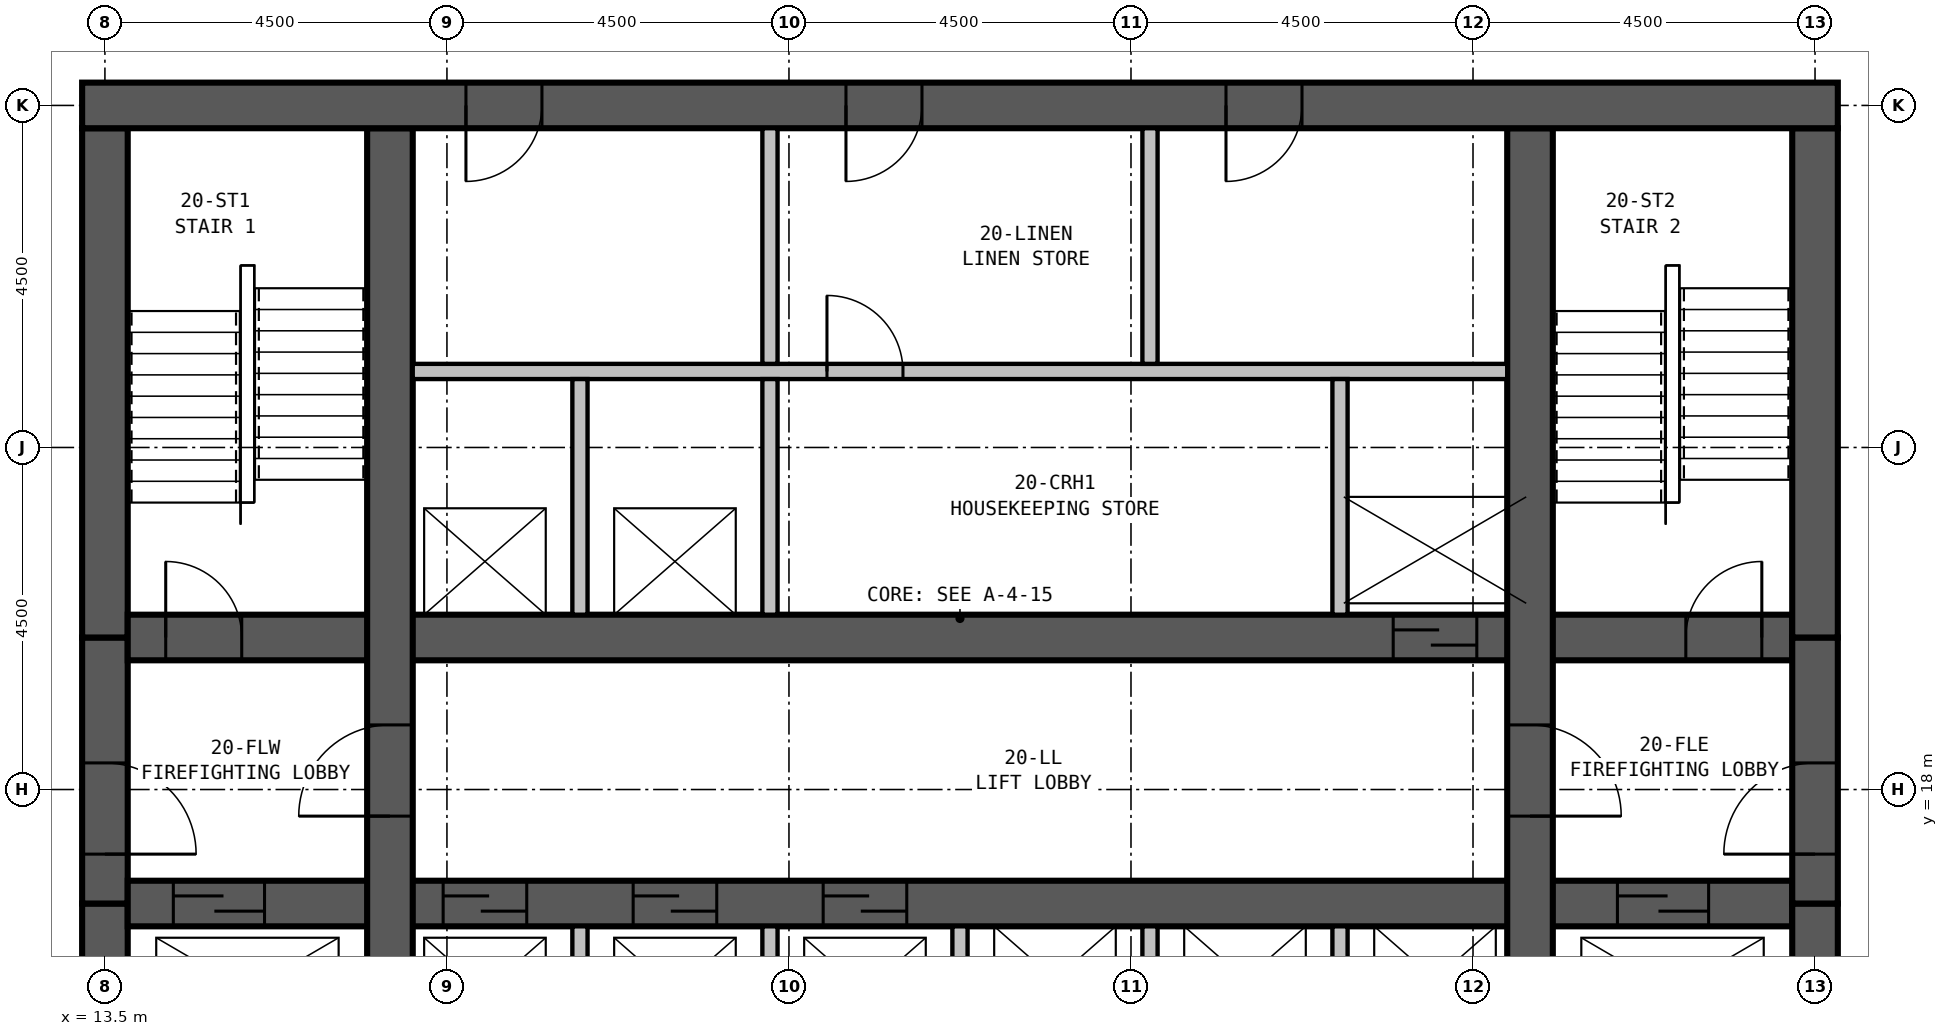
"""IFC4 building model, lengths in metres.
Left out: names, types, materials, properties, quantities, classifications, styles, units other than length and angle.
Written with IfcOpenShell. Run it as: python <this file> out.ifc"""

import sys

from ifc_helpers import new_model, si_unit, direction, frame, frame_2d, origin, place, context, subcontext, project, spatial, rectangle, extrude, element, fill, save


model = new_model("IFC4")
c1 = context("Model", 3, precision=1e-05, world=origin(), true_north=direction((0.0, 1.0)))
c2 = subcontext(c1, "Body", "Model", "MODEL_VIEW")
j1 = project(units=[si_unit("LENGTHUNIT", "METRE"), si_unit("PLANEANGLEUNIT", "RADIAN")], contexts=[c1])
p1 = place(None, origin())
s1 = spatial("IfcSite", under=j1, at=p1, CompositionType="ELEMENT")
p2 = place(p1, origin())
s2 = spatial("IfcBuilding", under=s1, at=p2, CompositionType="ELEMENT")
p3 = place(p2, frame((0.0, 0.0, 82.2)))
s3 = spatial("IfcBuildingStorey", under=s2, at=p3, CompositionType="ELEMENT", Elevation=82.2)
p4 = place(p3, frame((36.3, 27.0, 0.0), z_axis=(0.0, 0.0, 1.0), x_axis=(-1.0, 0.0, 0.0)))
e1 = element("IfcWall", 1, at=p4, inside=s3, PredefinedType="SHEAR", context=c2, shape_type="SweptSolid", body=[
    extrude(rectangle(XDim=23.1, YDim=0.6, at=frame_2d((11.55, 0.0))), origin(), (0.0, 0.0, 1.0), 3.5),
])
p5 = place(p4, frame((17.05, 0.0, 0.0)))
e2 = element("IfcOpeningElement", 2, at=p5, cuts=e1, PredefinedType="OPENING", context=c2, shape_type="SweptSolid", body=[
    extrude(rectangle(XDim=1.0, YDim=2.1, at=frame_2d((0.5, 1.05))), frame((0.0, 0.31, 0.0), z_axis=(0.0, -1.0, 0.0), x_axis=(1.0, 0.0, 0.0)), (0.0, 0.0, 1.0), 0.62),
])
p6 = place(p4, frame((12.05, 0.0, 0.0)))
e3 = element("IfcOpeningElement", 3, at=p6, cuts=e1, PredefinedType="OPENING", context=c2, shape_type="SweptSolid", body=[
    extrude(rectangle(XDim=1.0, YDim=2.1, at=frame_2d((0.5, 1.05))), frame((0.0, 0.31, 0.0), z_axis=(0.0, -1.0, 0.0), x_axis=(1.0, 0.0, 0.0)), (0.0, 0.0, 1.0), 0.62),
])
p7 = place(p4, frame((7.05, 0.0, 0.0)))
e4 = element("IfcOpeningElement", 4, at=p7, cuts=e1, PredefinedType="OPENING", context=c2, shape_type="SweptSolid", body=[
    extrude(rectangle(XDim=1.0, YDim=2.1, at=frame_2d((0.5, 1.05))), frame((0.0, 0.31, 0.0), z_axis=(0.0, -1.0, 0.0), x_axis=(1.0, 0.0, 0.0)), (0.0, 0.0, 1.0), 0.62),
])
p8 = place(p3, frame((17.25, 13.8, 0.0), z_axis=(0.0, 0.0, 1.0), x_axis=(0.0, 1.0, 0.0)))
e5 = element("IfcWall", 5, at=p8, inside=s3, PredefinedType="SHEAR", context=c2, shape_type="SweptSolid", body=[
    extrude(rectangle(XDim=12.9, YDim=0.6, at=frame_2d((6.45, 0.0))), origin(), (0.0, 0.0, 1.0), 3.5),
])
p9 = place(p8, frame((3.85, 0.0, 0.0)))
e6 = element("IfcOpeningElement", 6, at=p9, cuts=e5, PredefinedType="OPENING", context=c2, shape_type="SweptSolid", body=[
    extrude(rectangle(XDim=1.2, YDim=2.1, at=frame_2d((0.6, 1.05))), frame((0.0, 0.31, 0.0), z_axis=(0.0, -1.0, 0.0), x_axis=(1.0, 0.0, 0.0)), (0.0, 0.0, 1.0), 0.62),
])
p10 = place(p3, frame((32.25, 13.8, 0.0), z_axis=(0.0, 0.0, 1.0), x_axis=(0.0, 1.0, 0.0)))
e7 = element("IfcWall", 7, at=p10, inside=s3, PredefinedType="SHEAR", context=c2, shape_type="SweptSolid", body=[
    extrude(rectangle(XDim=12.9, YDim=0.6, at=frame_2d((6.45, 0.0))), origin(), (0.0, 0.0, 1.0), 3.5),
])
p11 = place(p10, frame((5.05, 0.0, 0.0), z_axis=(0.0, 0.0, 1.0), x_axis=(-1.0, 0.0, 0.0)))
e8 = element("IfcOpeningElement", 8, at=p11, cuts=e7, PredefinedType="OPENING", context=c2, shape_type="SweptSolid", body=[
    extrude(rectangle(XDim=1.2, YDim=2.1, at=frame_2d((0.6, 1.05))), frame((0.0, 0.31, 0.0), z_axis=(0.0, -1.0, 0.0), x_axis=(1.0, 0.0, 0.0)), (0.0, 0.0, 1.0), 0.62),
])
p12 = place(p3, frame((13.8, 16.5, 0.0), z_axis=(0.0, 0.0, 1.0), x_axis=(1.0, 0.0, 0.0)))
e9 = element("IfcWall", 9, at=p12, inside=s3, PredefinedType="SHEAR", context=c2, shape_type="SweptSolid", body=[
    extrude(rectangle(XDim=21.9, YDim=0.6, at=frame_2d((10.95, 0.0))), origin(), (0.0, 0.0, 1.0), 3.5),
])
p13 = place(p12, frame((4.15, 0.0, 0.0)))
e10 = element("IfcOpeningElement", 10, at=p13, cuts=e9, PredefinedType="OPENING", context=c2, shape_type="SweptSolid", body=[
    extrude(rectangle(XDim=1.1, YDim=2.1, at=frame_2d((0.55, 1.05))), frame((0.0, 0.31, 0.0), z_axis=(0.0, -1.0, 0.0), x_axis=(1.0, 0.0, 0.0)), (0.0, 0.0, 1.0), 0.62),
])
p14 = place(p12, frame((6.65, 0.0, 0.0)))
e11 = element("IfcOpeningElement", 11, at=p14, cuts=e9, PredefinedType="OPENING", context=c2, shape_type="SweptSolid", body=[
    extrude(rectangle(XDim=1.1, YDim=2.1, at=frame_2d((0.55, 1.05))), frame((0.0, 0.31, 0.0), z_axis=(0.0, -1.0, 0.0), x_axis=(1.0, 0.0, 0.0)), (0.0, 0.0, 1.0), 0.62),
])
p15 = place(p12, frame((9.15, 0.0, 0.0)))
e12 = element("IfcOpeningElement", 12, at=p15, cuts=e9, PredefinedType="OPENING", context=c2, shape_type="SweptSolid", body=[
    extrude(rectangle(XDim=1.1, YDim=2.1, at=frame_2d((0.55, 1.05))), frame((0.0, 0.31, 0.0), z_axis=(0.0, -1.0, 0.0), x_axis=(1.0, 0.0, 0.0)), (0.0, 0.0, 1.0), 0.62),
])
p16 = place(p12, frame((0.6, 0.0, 0.0)))
e13 = element("IfcOpeningElement", 13, at=p16, cuts=e9, PredefinedType="OPENING", context=c2, shape_type="SweptSolid", body=[
    extrude(rectangle(XDim=1.2, YDim=2.1, at=frame_2d((0.6, 1.05))), frame((0.0, 0.31, 0.0), z_axis=(0.0, -1.0, 0.0), x_axis=(1.0, 0.0, 0.0)), (0.0, 0.0, 1.0), 0.62),
])
p17 = place(p12, frame((19.6, 0.0, 0.0)))
e14 = element("IfcOpeningElement", 14, at=p17, cuts=e9, PredefinedType="OPENING", context=c2, shape_type="SweptSolid", body=[
    extrude(rectangle(XDim=1.2, YDim=2.1, at=frame_2d((0.6, 1.05))), frame((0.0, 0.31, 0.0), z_axis=(0.0, -1.0, 0.0), x_axis=(1.0, 0.0, 0.0)), (0.0, 0.0, 1.0), 0.62),
])
p18 = place(p3, frame((13.8, 20.0, 0.0), z_axis=(0.0, 0.0, 1.0), x_axis=(1.0, 0.0, 0.0)))
e15 = element("IfcWall", 15, at=p18, inside=s3, PredefinedType="SHEAR", context=c2, shape_type="SweptSolid", body=[
    extrude(rectangle(XDim=21.9, YDim=0.6, at=frame_2d((10.95, 0.0))), origin(), (0.0, 0.0, 1.0), 3.5),
])
p19 = place(p18, frame((0.5, 0.0, 0.0)))
e16 = element("IfcOpeningElement", 16, at=p19, cuts=e15, PredefinedType="OPENING", context=c2, shape_type="SweptSolid", body=[
    extrude(rectangle(XDim=1.0, YDim=2.1, at=frame_2d((0.5, 1.05))), frame((0.0, 0.31, 0.0), z_axis=(0.0, -1.0, 0.0), x_axis=(1.0, 0.0, 0.0)), (0.0, 0.0, 1.0), 0.62),
])
p20 = place(p18, frame((20.5, 0.0, 0.0)))
e17 = element("IfcOpeningElement", 17, at=p20, cuts=e15, PredefinedType="OPENING", context=c2, shape_type="SweptSolid", body=[
    extrude(rectangle(XDim=1.0, YDim=2.1, at=frame_2d((0.5, 1.05))), frame((0.0, 0.31, 0.0), z_axis=(0.0, -1.0, 0.0), x_axis=(1.0, 0.0, 0.0)), (0.0, 0.0, 1.0), 0.62),
])
p21 = place(p18, frame((16.65, 0.0, 0.0)))
e18 = element("IfcOpeningElement", 18, at=p21, cuts=e15, PredefinedType="OPENING", context=c2, shape_type="SweptSolid", body=[
    extrude(rectangle(XDim=1.1, YDim=2.1, at=frame_2d((0.55, 1.05))), frame((0.0, 0.31, 0.0), z_axis=(0.0, -1.0, 0.0), x_axis=(1.0, 0.0, 0.0)), (0.0, 0.0, 1.0), 0.62),
])
p22 = place(p3, frame((13.5, 26.7, 0.0), z_axis=(0.0, 0.0, 1.0), x_axis=(0.0, -1.0, 0.0)))
e19 = element("IfcWall", 19, at=p22, inside=s3, PredefinedType="SHEAR", context=c2, shape_type="SweptSolid", body=[
    extrude(rectangle(XDim=6.7, YDim=0.6, at=frame_2d((3.35, 0.0))), origin(), (0.0, 0.0, 1.0), 3.5),
])
p23 = place(p3, frame((13.5, 20.0, 0.0), z_axis=(0.0, 0.0, 1.0), x_axis=(0.0, -1.0, 0.0)))
e20 = element("IfcWall", 20, at=p23, inside=s3, PredefinedType="SHEAR", context=c2, shape_type="SweptSolid", body=[
    extrude(rectangle(XDim=3.5, YDim=0.6, at=frame_2d((1.75, 0.0))), origin(), (0.0, 0.0, 1.0), 3.5),
])
p24 = place(p23, frame((1.65, 0.0, 0.0)))
e21 = element("IfcOpeningElement", 21, at=p24, cuts=e20, PredefinedType="OPENING", context=c2, shape_type="SweptSolid", body=[
    extrude(rectangle(XDim=1.2, YDim=2.1, at=frame_2d((0.6, 1.05))), frame((0.0, 0.31, 0.0), z_axis=(0.0, -1.0, 0.0), x_axis=(1.0, 0.0, 0.0)), (0.0, 0.0, 1.0), 0.62),
])
for number, where, z_axis, x_axis in (
    (22, (13.5, 16.5, 0.0), (0.0, 0.0, 1.0), (0.0, -1.0, 0.0)),
    (23, (36.0, 13.8, 0.0), (0.0, 0.0, 1.0), (0.0, 1.0, 0.0)),
):
    element("IfcWall", number, at=place(p3, frame(where, z_axis=z_axis, x_axis=x_axis)), inside=s3, PredefinedType="SHEAR", context=c2, shape_type="SweptSolid", body=[
        extrude(rectangle(XDim=2.7, YDim=0.6, at=frame_2d((1.35, 0.0))), origin(), (0.0, 0.0, 1.0), 3.5),
    ])
p25 = place(p3, frame((36.0, 16.5, 0.0), z_axis=(0.0, 0.0, 1.0), x_axis=(0.0, 1.0, 0.0)))
e24 = element("IfcWall", 24, at=p25, inside=s3, PredefinedType="SHEAR", context=c2, shape_type="SweptSolid", body=[
    extrude(rectangle(XDim=3.5, YDim=0.6, at=frame_2d((1.75, 0.0))), origin(), (0.0, 0.0, 1.0), 3.5),
])
p26 = place(p25, frame((0.65, 0.0, 0.0)))
e25 = element("IfcOpeningElement", 25, at=p26, cuts=e24, PredefinedType="OPENING", context=c2, shape_type="SweptSolid", body=[
    extrude(rectangle(XDim=1.2, YDim=2.1, at=frame_2d((0.6, 1.05))), frame((0.0, 0.31, 0.0), z_axis=(0.0, -1.0, 0.0), x_axis=(1.0, 0.0, 0.0)), (0.0, 0.0, 1.0), 0.62),
])
p27 = place(p3, frame((36.0, 20.0, 0.0), z_axis=(0.0, 0.0, 1.0), x_axis=(0.0, 1.0, 0.0)))
e26 = element("IfcWall", 26, at=p27, inside=s3, PredefinedType="SHEAR", context=c2, shape_type="SweptSolid", body=[
    extrude(rectangle(XDim=6.7, YDim=0.6, at=frame_2d((3.35, 0.0))), origin(), (0.0, 0.0, 1.0), 3.5),
])
p28 = place(p3, frame((19.75, 13.8, 0.0), z_axis=(0.0, 0.0, 1.0), x_axis=(0.0, 1.0, 0.0)))
e27 = element("IfcWall", 27, at=p28, inside=s3, PredefinedType="PARTITIONING", context=c2, shape_type="SweptSolid", body=[
    extrude(rectangle(XDim=2.4, YDim=0.2, at=frame_2d((1.2, 0.0))), origin(), (0.0, 0.0, 1.0), 3.25),
])
p29 = place(p3, frame((19.75, 20.3, 0.0), z_axis=(0.0, 0.0, 1.0), x_axis=(0.0, 1.0, 0.0)))
e28 = element("IfcWall", 28, at=p29, inside=s3, PredefinedType="PARTITIONING", context=c2, shape_type="SweptSolid", body=[
    extrude(rectangle(XDim=3.1, YDim=0.2, at=frame_2d((1.55, 0.0))), origin(), (0.0, 0.0, 1.0), 3.25),
])
p30 = place(p3, frame((22.25, 13.8, 0.0), z_axis=(0.0, 0.0, 1.0), x_axis=(0.0, 1.0, 0.0)))
e29 = element("IfcWall", 29, at=p30, inside=s3, PredefinedType="PARTITIONING", context=c2, shape_type="SweptSolid", body=[
    extrude(rectangle(XDim=2.4, YDim=0.2, at=frame_2d((1.2, 0.0))), origin(), (0.0, 0.0, 1.0), 3.25),
])
p31 = place(p3, frame((22.25, 20.3, 0.0), z_axis=(0.0, 0.0, 1.0), x_axis=(0.0, 1.0, 0.0)))
e30 = element("IfcWall", 30, at=p31, inside=s3, PredefinedType="PARTITIONING", context=c2, shape_type="SweptSolid", body=[
    extrude(rectangle(XDim=3.1, YDim=0.2, at=frame_2d((1.55, 0.0))), origin(), (0.0, 0.0, 1.0), 3.25),
])
for number, where, z_axis, x_axis in (
    (31, (24.75, 13.8, 0.0), (0.0, 0.0, 1.0), (0.0, 1.0, 0.0)),
    (32, (27.25, 13.8, 0.0), (0.0, 0.0, 1.0), (0.0, 1.0, 0.0)),
    (33, (29.75, 13.8, 0.0), (0.0, 0.0, 1.0), (0.0, 1.0, 0.0)),
):
    element("IfcWall", number, at=place(p3, frame(where, z_axis=z_axis, x_axis=x_axis)), inside=s3, PredefinedType="PARTITIONING", context=c2, shape_type="SweptSolid", body=[
        extrude(rectangle(XDim=2.4, YDim=0.2, at=frame_2d((1.2, 0.0))), origin(), (0.0, 0.0, 1.0), 3.25),
    ])
p32 = place(p3, frame((29.75, 20.3, 0.0), z_axis=(0.0, 0.0, 1.0), x_axis=(0.0, 1.0, 0.0)))
e34 = element("IfcWall", 34, at=p32, inside=s3, PredefinedType="PARTITIONING", context=c2, shape_type="SweptSolid", body=[
    extrude(rectangle(XDim=3.1, YDim=0.2, at=frame_2d((1.55, 0.0))), origin(), (0.0, 0.0, 1.0), 3.25),
])
p33 = place(p3, frame((17.55, 23.5, 0.0), z_axis=(0.0, 0.0, 1.0), x_axis=(1.0, 0.0, 0.0)))
e35 = element("IfcWall", 35, at=p33, inside=s3, PredefinedType="PARTITIONING", context=c2, shape_type="SweptSolid", body=[
    extrude(rectangle(XDim=14.4, YDim=0.2, at=frame_2d((7.2, 0.0))), origin(), (0.0, 0.0, 1.0), 3.25),
])
p34 = place(p33, frame((5.45, 0.0, 0.0)))
e36 = element("IfcOpeningElement", 36, at=p34, cuts=e35, PredefinedType="OPENING", context=c2, shape_type="SweptSolid", body=[
    extrude(rectangle(XDim=1.0, YDim=2.1, at=frame_2d((0.5, 1.05))), frame((0.0, 0.11, 0.0), z_axis=(0.0, -1.0, 0.0), x_axis=(1.0, 0.0, 0.0)), (0.0, 0.0, 1.0), 0.22),
])
for number, where, z_axis, x_axis in (
    (37, (22.25, 23.6, 0.0), (0.0, 0.0, 1.0), (0.0, 1.0, 0.0)),
    (38, (27.25, 23.6, 0.0), (0.0, 0.0, 1.0), (0.0, 1.0, 0.0)),
):
    element("IfcWall", number, at=place(p3, frame(where, z_axis=z_axis, x_axis=x_axis)), inside=s3, PredefinedType="PARTITIONING", context=c2, shape_type="SweptSolid", body=[
        extrude(rectangle(XDim=3.1, YDim=0.2, at=frame_2d((1.55, 0.0))), origin(), (0.0, 0.0, 1.0), 3.25),
    ])
p35 = place(p34, origin())
e39 = element("IfcDoor", 39, at=p35, inside=s3, OperationType="SINGLE_SWING_LEFT", PredefinedType="DOOR", context=c2, shape_type="SweptSolid", body=[
    extrude(rectangle(XDim=1.0, YDim=2.1, at=frame_2d((0.5, 1.05))), frame((0.0, 0.025, 0.0), z_axis=(0.0, -1.0, 0.0), x_axis=(1.0, 0.0, 0.0)), (0.0, 0.0, 1.0), 0.05),
])
fill(e36, e39)
p36 = place(p24, origin())
e40 = element("IfcDoor", 40, at=p36, inside=s3, OperationType="SINGLE_SWING_RIGHT", PredefinedType="DOOR", context=c2, shape_type="SweptSolid", body=[
    extrude(rectangle(XDim=1.2, YDim=2.1, at=frame_2d((0.6, 1.05))), frame((0.0, 0.3, 0.0), z_axis=(0.0, -1.0, 0.0), x_axis=(1.0, 0.0, 0.0)), (0.0, 0.0, 1.0), 0.6),
])
fill(e21, e40)
p37 = place(p26, origin())
e41 = element("IfcDoor", 41, at=p37, inside=s3, OperationType="SINGLE_SWING_LEFT", PredefinedType="DOOR", context=c2, shape_type="SweptSolid", body=[
    extrude(rectangle(XDim=1.2, YDim=2.1, at=frame_2d((0.6, 1.05))), frame((0.0, 0.3, 0.0), z_axis=(0.0, -1.0, 0.0), x_axis=(1.0, 0.0, 0.0)), (0.0, 0.0, 1.0), 0.6),
])
fill(e25, e41)
p38 = place(p9, origin())
e42 = element("IfcDoor", 42, at=p38, inside=s3, OperationType="SINGLE_SWING_LEFT", PredefinedType="DOOR", context=c2, shape_type="SweptSolid", body=[
    extrude(rectangle(XDim=1.2, YDim=2.1, at=frame_2d((0.6, 1.05))), frame((0.0, 0.3, 0.0), z_axis=(0.0, -1.0, 0.0), x_axis=(1.0, 0.0, 0.0)), (0.0, 0.0, 1.0), 0.6),
])
fill(e6, e42)
p39 = place(p11, origin())
e43 = element("IfcDoor", 43, at=p39, inside=s3, OperationType="SINGLE_SWING_RIGHT", PredefinedType="DOOR", context=c2, shape_type="SweptSolid", body=[
    extrude(rectangle(XDim=1.2, YDim=2.1, at=frame_2d((0.6, 1.05))), frame((0.0, 0.3, 0.0), z_axis=(0.0, -1.0, 0.0), x_axis=(1.0, 0.0, 0.0)), (0.0, 0.0, 1.0), 0.6),
])
fill(e8, e43)
p40 = place(p19, origin())
e44 = element("IfcDoor", 44, at=p40, inside=s3, OperationType="SINGLE_SWING_LEFT", PredefinedType="DOOR", context=c2, shape_type="SweptSolid", body=[
    extrude(rectangle(XDim=1.0, YDim=2.1, at=frame_2d((0.5, 1.05))), frame((0.0, 0.3, 0.0), z_axis=(0.0, -1.0, 0.0), x_axis=(1.0, 0.0, 0.0)), (0.0, 0.0, 1.0), 0.6),
])
fill(e16, e44)
p41 = place(p20, origin())
e45 = element("IfcDoor", 45, at=p41, inside=s3, OperationType="SINGLE_SWING_RIGHT", PredefinedType="DOOR", context=c2, shape_type="SweptSolid", body=[
    extrude(rectangle(XDim=1.0, YDim=2.1, at=frame_2d((0.5, 1.05))), frame((0.0, 0.3, 0.0), z_axis=(0.0, -1.0, 0.0), x_axis=(1.0, 0.0, 0.0)), (0.0, 0.0, 1.0), 0.6),
])
fill(e17, e45)
p42 = place(p13, origin())
e46 = element("IfcDoor", 46, at=p42, inside=s3, OperationType="SLIDING_TO_LEFT", PredefinedType="DOOR", context=c2, shape_type="SweptSolid", body=[
    extrude(rectangle(XDim=1.1, YDim=2.1, at=frame_2d((0.55, 1.05))), frame((0.0, 0.3, 0.0), z_axis=(0.0, -1.0, 0.0), x_axis=(1.0, 0.0, 0.0)), (0.0, 0.0, 1.0), 0.6),
])
fill(e10, e46)
p43 = place(p14, origin())
e47 = element("IfcDoor", 47, at=p43, inside=s3, OperationType="SLIDING_TO_LEFT", PredefinedType="DOOR", context=c2, shape_type="SweptSolid", body=[
    extrude(rectangle(XDim=1.1, YDim=2.1, at=frame_2d((0.55, 1.05))), frame((0.0, 0.3, 0.0), z_axis=(0.0, -1.0, 0.0), x_axis=(1.0, 0.0, 0.0)), (0.0, 0.0, 1.0), 0.6),
])
fill(e11, e47)
p44 = place(p15, origin())
e48 = element("IfcDoor", 48, at=p44, inside=s3, OperationType="SLIDING_TO_LEFT", PredefinedType="DOOR", context=c2, shape_type="SweptSolid", body=[
    extrude(rectangle(XDim=1.1, YDim=2.1, at=frame_2d((0.55, 1.05))), frame((0.0, 0.3, 0.0), z_axis=(0.0, -1.0, 0.0), x_axis=(1.0, 0.0, 0.0)), (0.0, 0.0, 1.0), 0.6),
])
fill(e12, e48)
p45 = place(p21, origin())
e49 = element("IfcDoor", 49, at=p45, inside=s3, OperationType="SLIDING_TO_LEFT", PredefinedType="DOOR", context=c2, shape_type="SweptSolid", body=[
    extrude(rectangle(XDim=1.1, YDim=2.1, at=frame_2d((0.55, 1.05))), frame((0.0, 0.3, 0.0), z_axis=(0.0, -1.0, 0.0), x_axis=(1.0, 0.0, 0.0)), (0.0, 0.0, 1.0), 0.6),
])
fill(e18, e49)
p46 = place(p16, origin())
e50 = element("IfcDoor", 50, at=p46, inside=s3, OperationType="SLIDING_TO_LEFT", PredefinedType="DOOR", context=c2, shape_type="SweptSolid", body=[
    extrude(rectangle(XDim=1.2, YDim=2.1, at=frame_2d((0.6, 1.05))), frame((0.0, 0.3, 0.0), z_axis=(0.0, -1.0, 0.0), x_axis=(1.0, 0.0, 0.0)), (0.0, 0.0, 1.0), 0.6),
])
fill(e13, e50)
p47 = place(p17, origin())
e51 = element("IfcDoor", 51, at=p47, inside=s3, OperationType="SLIDING_TO_LEFT", PredefinedType="DOOR", context=c2, shape_type="SweptSolid", body=[
    extrude(rectangle(XDim=1.2, YDim=2.1, at=frame_2d((0.6, 1.05))), frame((0.0, 0.3, 0.0), z_axis=(0.0, -1.0, 0.0), x_axis=(1.0, 0.0, 0.0)), (0.0, 0.0, 1.0), 0.6),
])
fill(e14, e51)
p48 = place(p5, origin())
e52 = element("IfcDoor", 52, at=p48, inside=s3, OperationType="SINGLE_SWING_RIGHT", PredefinedType="DOOR", context=c2, shape_type="SweptSolid", body=[
    extrude(rectangle(XDim=1.0, YDim=2.1, at=frame_2d((0.5, 1.05))), frame((0.0, 0.3, 0.0), z_axis=(0.0, -1.0, 0.0), x_axis=(1.0, 0.0, 0.0)), (0.0, 0.0, 1.0), 0.6),
])
fill(e2, e52)
p49 = place(p6, origin())
e53 = element("IfcDoor", 53, at=p49, inside=s3, OperationType="SINGLE_SWING_RIGHT", PredefinedType="DOOR", context=c2, shape_type="SweptSolid", body=[
    extrude(rectangle(XDim=1.0, YDim=2.1, at=frame_2d((0.5, 1.05))), frame((0.0, 0.3, 0.0), z_axis=(0.0, -1.0, 0.0), x_axis=(1.0, 0.0, 0.0)), (0.0, 0.0, 1.0), 0.6),
])
fill(e3, e53)
p50 = place(p7, origin())
e54 = element("IfcDoor", 54, at=p50, inside=s3, OperationType="SINGLE_SWING_RIGHT", PredefinedType="DOOR", context=c2, shape_type="SweptSolid", body=[
    extrude(rectangle(XDim=1.0, YDim=2.1, at=frame_2d((0.5, 1.05))), frame((0.0, 0.3, 0.0), z_axis=(0.0, -1.0, 0.0), x_axis=(1.0, 0.0, 0.0)), (0.0, 0.0, 1.0), 0.6),
])
fill(e4, e54)
save(model, sys.argv[1])
